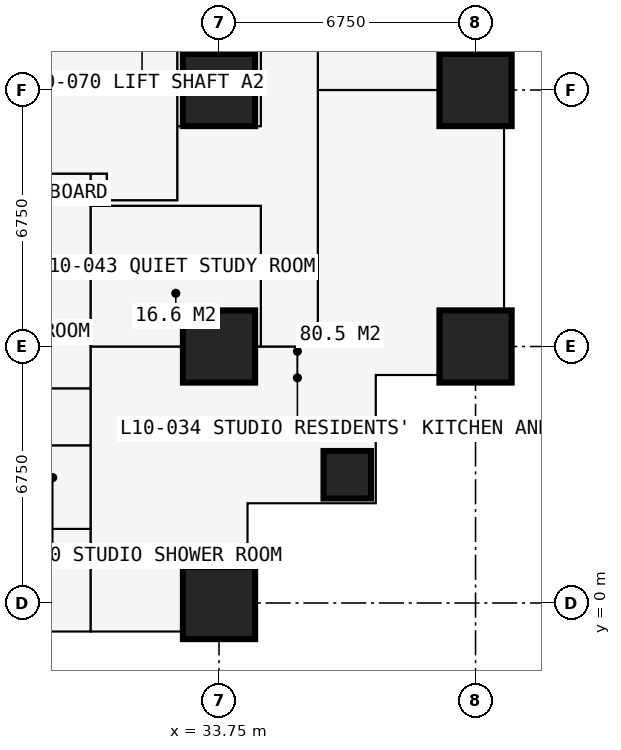
"""IFC4 building model, lengths in metres.
Left out: names, types, materials, properties, quantities, classifications, styles, units other than length and angle.
Written with IfcOpenShell. Run it as: python <this file> out.ifc"""

import sys

from ifc_helpers import new_model, si_unit, direction, frame, frame_2d, origin, origin_2d, place, context, subcontext, project, spatial, rectangle, extrude, element, fill, save


model = new_model("IFC4")
c1 = context("Model", 3, precision=1e-05, world=origin(), true_north=direction((0.0, 1.0)))
c2 = subcontext(c1, "Body", "Model", "MODEL_VIEW")
j1 = project(units=[si_unit("LENGTHUNIT", "METRE"), si_unit("PLANEANGLEUNIT", "RADIAN")], contexts=[c1])
p1 = place(None, origin())
s1 = spatial("IfcSite", under=j1, at=p1, CompositionType="ELEMENT")
p2 = place(p1, origin())
s2 = spatial("IfcBuilding", under=s1, at=p2, CompositionType="ELEMENT")
p3 = place(p2, frame((0.0, 0.0, 39.6)))
s3 = spatial("IfcBuildingStorey", under=s2, at=p3, CompositionType="ELEMENT", Elevation=39.6)
for number, where, z_axis, x_axis in (
    (1, (33.75, 0.0, 0.0), (0.0, 0.0, 1.0), (1.0, 0.0, 0.0)),
    (2, (33.75, 6.75, 0.0), (0.0, 0.0, 1.0), (1.0, 0.0, 0.0)),
    (3, (33.75, 13.5, 0.0), (0.0, 0.0, 1.0), (1.0, 0.0, 0.0)),
):
    element("IfcColumn", number, at=place(p3, frame(where, z_axis=z_axis, x_axis=x_axis)), inside=s3, PredefinedType="COLUMN", context=c2, shape_type="SweptSolid", body=[
        extrude(rectangle(XDim=1.9, YDim=1.9, at=origin_2d()), origin(), (0.0, 0.0, 1.0), 3.6),
    ])
p4 = place(p3, frame((37.125, 3.375, 0.0), z_axis=(0.0, 0.0, 1.0), x_axis=(1.0, 0.0, 0.0)))
e4 = element("IfcColumn", 4, at=p4, inside=s3, PredefinedType="COLUMN", context=c2, shape_type="SweptSolid", body=[
    extrude(rectangle(XDim=1.25, YDim=1.25, at=origin_2d()), origin(), (0.0, 0.0, 1.0), 3.6),
])
for number, where, z_axis, x_axis in (
    (5, (40.5, 6.75, 0.0), (0.0, 0.0, 1.0), (1.0, 0.0, 0.0)),
    (6, (40.5, 13.5, 0.0), (0.0, 0.0, 1.0), (1.0, 0.0, 0.0)),
):
    element("IfcColumn", number, at=place(p3, frame(where, z_axis=z_axis, x_axis=x_axis)), inside=s3, PredefinedType="COLUMN", context=c2, shape_type="SweptSolid", body=[
        extrude(rectangle(XDim=1.9, YDim=1.9, at=origin_2d()), origin(), (0.0, 0.0, 1.0), 3.6),
    ])
p5 = place(p3, frame((41.25, 20.25, 0.0), z_axis=(0.0, 0.0, 1.0), x_axis=(0.0, -1.0, 0.0)))
e7 = element("IfcWall", 7, at=p5, inside=s3, PredefinedType="SOLIDWALL", context=c2, shape_type="SweptSolid", body=[
    extrude(rectangle(XDim=6.75, YDim=0.15, at=frame_2d((3.375, 0.0))), origin(), (0.0, 0.0, 1.0), 3.375),
])
p6 = place(p5, frame((0.996, 0.0, 0.0)))
e8 = element("IfcOpeningElement", 8, at=p6, cuts=e7, PredefinedType="OPENING", context=c2, shape_type="SweptSolid", body=[
    extrude(rectangle(XDim=1.0, YDim=2.2, at=frame_2d((0.5, 1.1))), frame((0.0, 0.085, 0.0), z_axis=(0.0, -1.0, 0.0), x_axis=(1.0, 0.0, 0.0)), (0.0, 0.0, 1.0), 0.17),
])
p7 = place(p5, frame((2.042, 0.0, 0.9)))
e9 = element("IfcOpeningElement", 9, at=p7, cuts=e7, PredefinedType="OPENING", context=c2, shape_type="SweptSolid", body=[
    extrude(rectangle(XDim=1.2, YDim=1.8, at=frame_2d((0.6, 0.9))), frame((0.0, 0.085, 0.0), z_axis=(0.0, -1.0, 0.0), x_axis=(1.0, 0.0, 0.0)), (0.0, 0.0, 1.0), 0.17),
])
p8 = place(p5, frame((4.754, 0.0, 0.0)))
e10 = element("IfcOpeningElement", 10, at=p8, cuts=e7, PredefinedType="OPENING", context=c2, shape_type="SweptSolid", body=[
    extrude(rectangle(XDim=1.0, YDim=2.2, at=frame_2d((0.5, 1.1))), frame((0.0, 0.085, 0.0), z_axis=(0.0, -1.0, 0.0), x_axis=(1.0, 0.0, 0.0)), (0.0, 0.0, 1.0), 0.17),
])
p9 = place(p5, frame((3.508, 0.0, 0.9)))
e11 = element("IfcOpeningElement", 11, at=p9, cuts=e7, PredefinedType="OPENING", context=c2, shape_type="SweptSolid", body=[
    extrude(rectangle(XDim=1.2, YDim=1.8, at=frame_2d((0.6, 0.9))), frame((0.0, 0.085, 0.0), z_axis=(0.0, -1.0, 0.0), x_axis=(1.0, 0.0, 0.0)), (0.0, 0.0, 1.0), 0.17),
])
p10 = place(p3, frame((34.5, -0.75, 0.0), z_axis=(0.0, 0.0, 1.0), x_axis=(0.0, 1.0, 0.0)))
e12 = element("IfcWall", 12, at=p10, inside=s3, PredefinedType="SOLIDWALL", context=c2, shape_type="SweptSolid", body=[
    extrude(rectangle(XDim=3.375, YDim=0.3, at=frame_2d((1.688, 0.0))), origin(), (0.0, 0.0, 1.0), 3.375),
])
p11 = place(p10, frame((1.857, 0.0, 0.9)))
e13 = element("IfcOpeningElement", 13, at=p11, cuts=e12, PredefinedType="OPENING", context=c2, shape_type="SweptSolid", body=[
    extrude(rectangle(XDim=1.2, YDim=1.8, at=frame_2d((0.6, 0.9))), frame((0.0, 0.16, 0.0), z_axis=(0.0, -1.0, 0.0), x_axis=(1.0, 0.0, 0.0)), (0.0, 0.0, 1.0), 0.32),
])
p12 = place(p3, frame((34.5, 2.625, 0.0), z_axis=(0.0, 0.0, 1.0), x_axis=(1.0, 0.0, 0.0)))
e14 = element("IfcWall", 14, at=p12, inside=s3, PredefinedType="SOLIDWALL", context=c2, shape_type="SweptSolid", body=[
    extrude(rectangle(XDim=3.375, YDim=0.3, at=frame_2d((1.688, 0.0))), origin(), (0.0, 0.0, 1.0), 3.375),
])
p13 = place(p12, frame((0.788, 0.0, 0.6)))
e15 = element("IfcOpeningElement", 15, at=p13, cuts=e14, PredefinedType="OPENING", context=c2, shape_type="SweptSolid", body=[
    extrude(rectangle(XDim=1.8, YDim=2.1, at=frame_2d((0.9, 1.05))), frame((0.0, 0.16, 0.0), z_axis=(0.0, -1.0, 0.0), x_axis=(1.0, 0.0, 0.0)), (0.0, 0.0, 1.0), 0.32),
])
p14 = place(p3, frame((37.875, 2.625, 0.0), z_axis=(0.0, 0.0, 1.0), x_axis=(0.0, 1.0, 0.0)))
e16 = element("IfcWall", 16, at=p14, inside=s3, PredefinedType="SOLIDWALL", context=c2, shape_type="SweptSolid", body=[
    extrude(rectangle(XDim=3.375, YDim=0.3, at=frame_2d((1.688, 0.0))), origin(), (0.0, 0.0, 1.0), 3.375),
])
p15 = place(p14, frame((0.788, 0.0, 0.6)))
e17 = element("IfcOpeningElement", 17, at=p15, cuts=e16, PredefinedType="OPENING", context=c2, shape_type="SweptSolid", body=[
    extrude(rectangle(XDim=1.8, YDim=2.1, at=frame_2d((0.9, 1.05))), frame((0.0, 0.16, 0.0), z_axis=(0.0, -1.0, 0.0), x_axis=(1.0, 0.0, 0.0)), (0.0, 0.0, 1.0), 0.32),
])
p16 = place(p3, frame((37.875, 6.0, 0.0), z_axis=(0.0, 0.0, 1.0), x_axis=(1.0, 0.0, 0.0)))
e18 = element("IfcWall", 18, at=p16, inside=s3, PredefinedType="SOLIDWALL", context=c2, shape_type="SweptSolid", body=[
    extrude(rectangle(XDim=3.375, YDim=0.3, at=frame_2d((1.688, 0.0))), origin(), (0.0, 0.0, 1.0), 3.375),
])
p17 = place(p16, frame((0.317, 0.0, 0.9)))
e19 = element("IfcOpeningElement", 19, at=p17, cuts=e18, PredefinedType="OPENING", context=c2, shape_type="SweptSolid", body=[
    extrude(rectangle(XDim=1.2, YDim=1.8, at=frame_2d((0.6, 0.9))), frame((0.0, 0.16, 0.0), z_axis=(0.0, -1.0, 0.0), x_axis=(1.0, 0.0, 0.0)), (0.0, 0.0, 1.0), 0.32),
])
p18 = place(p3, frame((6.75, 4.15, 0.0), z_axis=(0.0, 0.0, 1.0), x_axis=(1.0, 0.0, 0.0)))
e20 = element("IfcWall", 20, at=p18, inside=s3, PredefinedType="PARTITIONING", context=c2, shape_type="SweptSolid", body=[
    extrude(rectangle(XDim=23.625, YDim=0.1, at=frame_2d((11.812, 0.0))), origin(), (0.0, 0.0, 1.0), 3.375),
])
p19 = place(p18, frame((1.2, 0.0, 0.0)))
e21 = element("IfcOpeningElement", 21, at=p19, cuts=e20, PredefinedType="OPENING", context=c2, shape_type="SweptSolid", body=[
    extrude(rectangle(XDim=1.0, YDim=2.2, at=frame_2d((0.5, 1.1))), frame((0.0, 0.06, 0.0), z_axis=(0.0, -1.0, 0.0), x_axis=(1.0, 0.0, 0.0)), (0.0, 0.0, 1.0), 0.12),
])
p20 = place(p18, frame((3.575, 0.0, 0.0)))
e22 = element("IfcOpeningElement", 22, at=p20, cuts=e20, PredefinedType="OPENING", context=c2, shape_type="SweptSolid", body=[
    extrude(rectangle(XDim=0.95, YDim=2.2, at=frame_2d((0.475, 1.1))), frame((0.0, 0.06, 0.0), z_axis=(0.0, -1.0, 0.0), x_axis=(1.0, 0.0, 0.0)), (0.0, 0.0, 1.0), 0.12),
])
p21 = place(p18, frame((7.0, 0.0, 0.0)))
e23 = element("IfcOpeningElement", 23, at=p21, cuts=e20, PredefinedType="OPENING", context=c2, shape_type="SweptSolid", body=[
    extrude(rectangle(XDim=0.95, YDim=2.2, at=frame_2d((0.475, 1.1))), frame((0.0, 0.06, 0.0), z_axis=(0.0, -1.0, 0.0), x_axis=(1.0, 0.0, 0.0)), (0.0, 0.0, 1.0), 0.12),
])
p22 = place(p18, frame((10.375, 0.0, 0.0)))
e24 = element("IfcOpeningElement", 24, at=p22, cuts=e20, PredefinedType="OPENING", context=c2, shape_type="SweptSolid", body=[
    extrude(rectangle(XDim=0.95, YDim=2.2, at=frame_2d((0.475, 1.1))), frame((0.0, 0.06, 0.0), z_axis=(0.0, -1.0, 0.0), x_axis=(1.0, 0.0, 0.0)), (0.0, 0.0, 1.0), 0.12),
])
p23 = place(p18, frame((13.7, 0.0, 0.0)))
e25 = element("IfcOpeningElement", 25, at=p23, cuts=e20, PredefinedType="OPENING", context=c2, shape_type="SweptSolid", body=[
    extrude(rectangle(XDim=0.95, YDim=2.2, at=frame_2d((0.475, 1.1))), frame((0.0, 0.06, 0.0), z_axis=(0.0, -1.0, 0.0), x_axis=(1.0, 0.0, 0.0)), (0.0, 0.0, 1.0), 0.12),
])
p24 = place(p18, frame((17.125, 0.0, 0.0)))
e26 = element("IfcOpeningElement", 26, at=p24, cuts=e20, PredefinedType="OPENING", context=c2, shape_type="SweptSolid", body=[
    extrude(rectangle(XDim=0.95, YDim=2.2, at=frame_2d((0.475, 1.1))), frame((0.0, 0.06, 0.0), z_axis=(0.0, -1.0, 0.0), x_axis=(1.0, 0.0, 0.0)), (0.0, 0.0, 1.0), 0.12),
])
p25 = place(p18, frame((20.5, 0.0, 0.0)))
e27 = element("IfcOpeningElement", 27, at=p25, cuts=e20, PredefinedType="OPENING", context=c2, shape_type="SweptSolid", body=[
    extrude(rectangle(XDim=0.95, YDim=2.2, at=frame_2d((0.475, 1.1))), frame((0.0, 0.06, 0.0), z_axis=(0.0, -1.0, 0.0), x_axis=(1.0, 0.0, 0.0)), (0.0, 0.0, 1.0), 0.12),
])
p26 = place(p3, frame((10.125, 11.3, 0.0), z_axis=(0.0, 0.0, 1.0), x_axis=(1.0, 0.0, 0.0)))
e28 = element("IfcWall", 28, at=p26, inside=s3, PredefinedType="PARTITIONING", context=c2, shape_type="SweptSolid", body=[
    extrude(rectangle(XDim=20.675, YDim=0.15, at=frame_2d((10.337, 0.0))), origin(), (0.0, 0.0, 1.0), 3.375),
])
p27 = place(p26, frame((8.375, 0.0, 0.0)))
e29 = element("IfcOpeningElement", 29, at=p27, cuts=e28, PredefinedType="OPENING", context=c2, shape_type="SweptSolid", body=[
    extrude(rectangle(XDim=1.0, YDim=2.2, at=frame_2d((0.5, 1.1))), frame((0.0, 0.085, 0.0), z_axis=(0.0, -1.0, 0.0), x_axis=(1.0, 0.0, 0.0)), (0.0, 0.0, 1.0), 0.17),
])
p28 = place(p26, frame((10.975, 0.0, 0.0)))
e30 = element("IfcOpeningElement", 30, at=p28, cuts=e28, PredefinedType="OPENING", context=c2, shape_type="SweptSolid", body=[
    extrude(rectangle(XDim=1.0, YDim=2.2, at=frame_2d((0.5, 1.1))), frame((0.0, 0.085, 0.0), z_axis=(0.0, -1.0, 0.0), x_axis=(1.0, 0.0, 0.0)), (0.0, 0.0, 1.0), 0.17),
])
p29 = place(p26, frame((3.925, 0.0, 0.0)))
e31 = element("IfcOpeningElement", 31, at=p29, cuts=e28, PredefinedType="OPENING", context=c2, shape_type="SweptSolid", body=[
    extrude(rectangle(XDim=0.95, YDim=2.2, at=frame_2d((0.475, 1.1))), frame((0.0, 0.085, 0.0), z_axis=(0.0, -1.0, 0.0), x_axis=(1.0, 0.0, 0.0)), (0.0, 0.0, 1.0), 0.17),
])
p30 = place(p3, frame((22.988, 5.65, 0.0), z_axis=(0.0, 0.0, 1.0), x_axis=(1.0, 0.0, 0.0)))
e32 = element("IfcWall", 32, at=p30, inside=s3, PredefinedType="PARTITIONING", context=c2, shape_type="SweptSolid", body=[
    extrude(rectangle(XDim=7.387, YDim=0.15, at=frame_2d((3.694, 0.0))), origin(), (0.0, 0.0, 1.0), 3.375),
])
p31 = place(p30, frame((2.1, 0.0, 0.0)))
e33 = element("IfcOpeningElement", 33, at=p31, cuts=e32, PredefinedType="OPENING", context=c2, shape_type="SweptSolid", body=[
    extrude(rectangle(XDim=0.95, YDim=2.2, at=frame_2d((0.475, 1.1))), frame((0.0, 0.085, 0.0), z_axis=(0.0, -1.0, 0.0), x_axis=(1.0, 0.0, 0.0)), (0.0, 0.0, 1.0), 0.17),
])
p32 = place(p3, frame((28.375, 1.95, 0.0), z_axis=(0.0, 0.0, 1.0), x_axis=(1.0, 0.0, 0.0)))
e34 = element("IfcWall", 34, at=p32, inside=s3, PredefinedType="PARTITIONING", context=c2, shape_type="SweptSolid", body=[
    extrude(rectangle(XDim=2.0, YDim=0.1, at=frame_2d((1.0, 0.0))), origin(), (0.0, 0.0, 1.0), 3.375),
])
p33 = place(p3, frame((30.375, -0.734, 0.0), z_axis=(0.0, 0.0, 1.0), x_axis=(0.0, 1.0, 0.0)))
e35 = element("IfcWall", 35, at=p33, inside=s3, PredefinedType="PARTITIONING", context=c2, shape_type="SweptSolid", body=[
    extrude(rectangle(XDim=12.034, YDim=0.15, at=frame_2d((6.017, 0.0))), origin(), (0.0, 0.0, 1.0), 3.375),
])
p34 = place(p33, frame((5.134, 0.0, 0.0)))
e36 = element("IfcOpeningElement", 36, at=p34, cuts=e35, PredefinedType="OPENING", context=c2, shape_type="SweptSolid", body=[
    extrude(rectangle(XDim=1.0, YDim=2.2, at=frame_2d((0.5, 1.1))), frame((0.0, 0.085, 0.0), z_axis=(0.0, -1.0, 0.0), x_axis=(1.0, 0.0, 0.0)), (0.0, 0.0, 1.0), 0.17),
])
p35 = place(p3, frame((30.375, 6.75, 0.0), z_axis=(0.0, 0.0, 1.0), x_axis=(1.0, 0.0, 0.0)))
e37 = element("IfcWall", 37, at=p35, inside=s3, PredefinedType="PARTITIONING", context=c2, shape_type="SweptSolid", body=[
    extrude(rectangle(XDim=5.975, YDim=0.15, at=frame_2d((2.988, 0.0))), origin(), (0.0, 0.0, 1.0), 2.877),
])
p36 = place(p3, frame((30.375, 10.45, 0.0), z_axis=(0.0, 0.0, 1.0), x_axis=(1.0, 0.0, 0.0)))
e38 = element("IfcWall", 38, at=p36, inside=s3, PredefinedType="PARTITIONING", context=c2, shape_type="SweptSolid", body=[
    extrude(rectangle(XDim=4.475, YDim=0.15, at=frame_2d((2.238, 0.0))), origin(), (0.0, 0.0, 1.0), 3.375),
])
p37 = place(p36, frame((2.35, 0.0, 0.0)))
e39 = element("IfcOpeningElement", 39, at=p37, cuts=e38, PredefinedType="OPENING", context=c2, shape_type="SweptSolid", body=[
    extrude(rectangle(XDim=0.95, YDim=2.2, at=frame_2d((0.475, 1.1))), frame((0.0, 0.085, 0.0), z_axis=(0.0, -1.0, 0.0), x_axis=(1.0, 0.0, 0.0)), (0.0, 0.0, 1.0), 0.17),
])
p38 = place(p3, frame((30.8, 10.6, 0.0), z_axis=(0.0, 0.0, 1.0), x_axis=(0.0, 1.0, 0.0)))
e40 = element("IfcWall", 40, at=p38, inside=s3, PredefinedType="PARTITIONING", context=c2, shape_type="SweptSolid", body=[
    extrude(rectangle(XDim=0.7, YDim=0.15, at=frame_2d((0.35, 0.0))), origin(), (0.0, 0.0, 1.0), 3.375),
])
p39 = place(p3, frame((30.8, 10.6, 0.0), z_axis=(0.0, 0.0, 1.0), x_axis=(1.0, 0.0, 0.0)))
e41 = element("IfcWall", 41, at=p39, inside=s3, PredefinedType="PARTITIONING", context=c2, shape_type="SweptSolid", body=[
    extrude(rectangle(XDim=1.85, YDim=0.15, at=frame_2d((0.925, 0.0))), origin(), (0.0, 0.0, 1.0), 3.375),
])
p40 = place(p3, frame((32.65, 10.6, 0.0), z_axis=(0.0, 0.0, 1.0), x_axis=(0.0, 1.0, 0.0)))
e42 = element("IfcWall", 42, at=p40, inside=s3, PredefinedType="SHEAR", context=c2, shape_type="SweptSolid", body=[
    extrude(rectangle(XDim=9.3, YDim=0.1, at=frame_2d((4.65, 0.0))), origin(), (0.0, 0.0, 1.0), 3.375),
])
p41 = place(p40, frame((0.5, 0.0, 0.0)))
e43 = element("IfcOpeningElement", 43, at=p41, cuts=e42, PredefinedType="OPENING", context=c2, shape_type="SweptSolid", body=[
    extrude(rectangle(XDim=1.0, YDim=2.2, at=frame_2d((0.5, 1.1))), frame((0.0, 0.06, 0.0), z_axis=(0.0, -1.0, 0.0), x_axis=(1.0, 0.0, 0.0)), (0.0, 0.0, 1.0), 0.12),
])
p42 = place(p3, frame((32.65, 12.55, 0.0), z_axis=(0.0, 0.0, 1.0), x_axis=(1.0, 0.0, 0.0)))
e44 = element("IfcWall", 44, at=p42, inside=s3, PredefinedType="PARTITIONING", context=c2, shape_type="SweptSolid", body=[
    extrude(rectangle(XDim=2.2, YDim=0.15, at=frame_2d((1.1, 0.0))), origin(), (0.0, 0.0, 1.0), 3.375),
])
p43 = place(p3, frame((34.85, 6.75, 0.0), z_axis=(0.0, 0.0, 1.0), x_axis=(0.0, 1.0, 0.0)))
e45 = element("IfcWall", 45, at=p43, inside=s3, PredefinedType="PARTITIONING", context=c2, shape_type="SweptSolid", body=[
    extrude(rectangle(XDim=3.7, YDim=0.15, at=frame_2d((1.85, 0.0))), origin(), (0.0, 0.0, 1.0), 3.375),
])
p44 = place(p3, frame((34.85, 12.55, 0.0), z_axis=(0.0, 0.0, 1.0), x_axis=(0.0, 1.0, 0.0)))
e46 = element("IfcWall", 46, at=p44, inside=s3, PredefinedType="PARTITIONING", context=c2, shape_type="SweptSolid", body=[
    extrude(rectangle(XDim=17.825, YDim=0.15, at=frame_2d((8.913, 0.0))), origin(), (0.0, 0.0, 1.0), 3.375),
])
p45 = place(p44, frame((8.65, 0.0, 0.0)))
e47 = element("IfcOpeningElement", 47, at=p45, cuts=e46, PredefinedType="OPENING", context=c2, shape_type="SweptSolid", body=[
    extrude(rectangle(XDim=0.95, YDim=2.2, at=frame_2d((0.475, 1.1))), frame((0.0, 0.085, 0.0), z_axis=(0.0, -1.0, 0.0), x_axis=(1.0, 0.0, 0.0)), (0.0, 0.0, 1.0), 0.17),
])
p46 = place(p3, frame((36.35, 6.75, 0.0), z_axis=(0.0, 0.0, 1.0), x_axis=(0.0, 1.0, 0.0)))
e48 = element("IfcWall", 48, at=p46, inside=s3, PredefinedType="PARTITIONING", context=c2, shape_type="SweptSolid", body=[
    extrude(rectangle(XDim=23.625, YDim=0.15, at=frame_2d((11.812, 0.0))), origin(), (0.0, 0.0, 1.0), 3.375),
])
p47 = place(p46, frame((18.475, 0.0, 0.0)))
e49 = element("IfcOpeningElement", 49, at=p47, cuts=e48, PredefinedType="OPENING", context=c2, shape_type="SweptSolid", body=[
    extrude(rectangle(XDim=0.95, YDim=2.2, at=frame_2d((0.475, 1.1))), frame((0.0, 0.085, 0.0), z_axis=(0.0, -1.0, 0.0), x_axis=(1.0, 0.0, 0.0)), (0.0, 0.0, 1.0), 0.17),
])
p48 = place(p46, frame((11.725, 0.0, 0.0)))
e50 = element("IfcOpeningElement", 50, at=p48, cuts=e48, PredefinedType="OPENING", context=c2, shape_type="SweptSolid", body=[
    extrude(rectangle(XDim=0.95, YDim=2.2, at=frame_2d((0.475, 1.1))), frame((0.0, 0.085, 0.0), z_axis=(0.0, -1.0, 0.0), x_axis=(1.0, 0.0, 0.0)), (0.0, 0.0, 1.0), 0.17),
])
p49 = place(p46, frame((6.95, 0.0, 0.0)))
e51 = element("IfcOpeningElement", 51, at=p49, cuts=e48, PredefinedType="OPENING", context=c2, shape_type="SweptSolid", body=[
    extrude(rectangle(XDim=0.95, YDim=2.2, at=frame_2d((0.475, 1.1))), frame((0.0, 0.085, 0.0), z_axis=(0.0, -1.0, 0.0), x_axis=(1.0, 0.0, 0.0)), (0.0, 0.0, 1.0), 0.17),
])
p50 = place(p3, frame((36.35, 13.5, 0.0), z_axis=(0.0, 0.0, 1.0), x_axis=(1.0, 0.0, 0.0)))
e52 = element("IfcWall", 52, at=p50, inside=s3, PredefinedType="PARTITIONING", context=c2, shape_type="SweptSolid", body=[
    extrude(rectangle(XDim=4.884, YDim=0.15, at=frame_2d((2.442, 0.0))), origin(), (0.0, 0.0, 1.0), 2.877),
])
p51 = place(p8, origin())
e53 = element("IfcDoor", 53, at=p51, inside=s3, OperationType="SINGLE_SWING_RIGHT", PredefinedType="DOOR", context=c2, shape_type="SweptSolid", body=[
    extrude(rectangle(XDim=1.0, YDim=2.2, at=frame_2d((0.5, 1.1))), frame((0.0, 0.025, 0.0), z_axis=(0.0, -1.0, 0.0), x_axis=(1.0, 0.0, 0.0)), (0.0, 0.0, 1.0), 0.05),
])
fill(e10, e53)
p52 = place(p11, origin())
e54 = element("IfcWindow", 54, at=p52, inside=s3, PartitioningType="SINGLE_PANEL", PredefinedType="WINDOW", context=c2, shape_type="SweptSolid", body=[
    extrude(rectangle(XDim=1.2, YDim=1.8, at=frame_2d((0.6, 0.9))), frame((0.0, 0.03, 0.0), z_axis=(0.0, -1.0, 0.0), x_axis=(1.0, 0.0, 0.0)), (0.0, 0.0, 1.0), 0.06),
])
fill(e13, e54)
p53 = place(p13, origin())
e55 = element("IfcWindow", 55, at=p53, inside=s3, PartitioningType="SINGLE_PANEL", PredefinedType="WINDOW", context=c2, shape_type="SweptSolid", body=[
    extrude(rectangle(XDim=1.8, YDim=2.1, at=frame_2d((0.9, 1.05))), frame((0.0, 0.03, 0.0), z_axis=(0.0, -1.0, 0.0), x_axis=(1.0, 0.0, 0.0)), (0.0, 0.0, 1.0), 0.06),
])
fill(e15, e55)
p54 = place(p15, origin())
e56 = element("IfcWindow", 56, at=p54, inside=s3, PartitioningType="SINGLE_PANEL", PredefinedType="WINDOW", context=c2, shape_type="SweptSolid", body=[
    extrude(rectangle(XDim=1.8, YDim=2.1, at=frame_2d((0.9, 1.05))), frame((0.0, 0.03, 0.0), z_axis=(0.0, -1.0, 0.0), x_axis=(1.0, 0.0, 0.0)), (0.0, 0.0, 1.0), 0.06),
])
fill(e17, e56)
p55 = place(p17, origin())
e57 = element("IfcWindow", 57, at=p55, inside=s3, PartitioningType="SINGLE_PANEL", PredefinedType="WINDOW", context=c2, shape_type="SweptSolid", body=[
    extrude(rectangle(XDim=1.2, YDim=1.8, at=frame_2d((0.6, 0.9))), frame((0.0, 0.03, 0.0), z_axis=(0.0, -1.0, 0.0), x_axis=(1.0, 0.0, 0.0)), (0.0, 0.0, 1.0), 0.06),
])
fill(e19, e57)
p56 = place(p34, origin())
e58 = element("IfcDoor", 58, at=p56, inside=s3, OperationType="SINGLE_SWING_LEFT", PredefinedType="DOOR", context=c2, shape_type="SweptSolid", body=[
    extrude(rectangle(XDim=1.0, YDim=2.2, at=frame_2d((0.5, 1.1))), frame((0.0, 0.025, 0.0), z_axis=(0.0, -1.0, 0.0), x_axis=(1.0, 0.0, 0.0)), (0.0, 0.0, 1.0), 0.05),
])
fill(e36, e58)
p57 = place(p49, origin())
e59 = element("IfcDoor", 59, at=p57, inside=s3, OperationType="SINGLE_SWING_LEFT", PredefinedType="DOOR", context=c2, shape_type="SweptSolid", body=[
    extrude(rectangle(XDim=0.95, YDim=2.2, at=frame_2d((0.475, 1.1))), frame((0.0, 0.025, 0.0), z_axis=(0.0, -1.0, 0.0), x_axis=(1.0, 0.0, 0.0)), (0.0, 0.0, 1.0), 0.05),
])
fill(e51, e59)
p58 = place(p41, origin())
e60 = element("IfcDoor", 60, at=p58, inside=s3, OperationType="SINGLE_SWING_LEFT", PredefinedType="DOOR", context=c2, shape_type="SweptSolid", body=[
    extrude(rectangle(XDim=1.0, YDim=2.2, at=frame_2d((0.5, 1.1))), frame((0.0, 0.025, 0.0), z_axis=(0.0, -1.0, 0.0), x_axis=(1.0, 0.0, 0.0)), (0.0, 0.0, 1.0), 0.05),
])
fill(e43, e60)
p59 = place(p37, origin())
e61 = element("IfcDoor", 61, at=p59, inside=s3, OperationType="SINGLE_SWING_LEFT", PredefinedType="DOOR", context=c2, shape_type="SweptSolid", body=[
    extrude(rectangle(XDim=0.95, YDim=2.2, at=frame_2d((0.475, 1.1))), frame((0.0, 0.025, 0.0), z_axis=(0.0, -1.0, 0.0), x_axis=(1.0, 0.0, 0.0)), (0.0, 0.0, 1.0), 0.05),
])
fill(e39, e61)
save(model, sys.argv[1])
